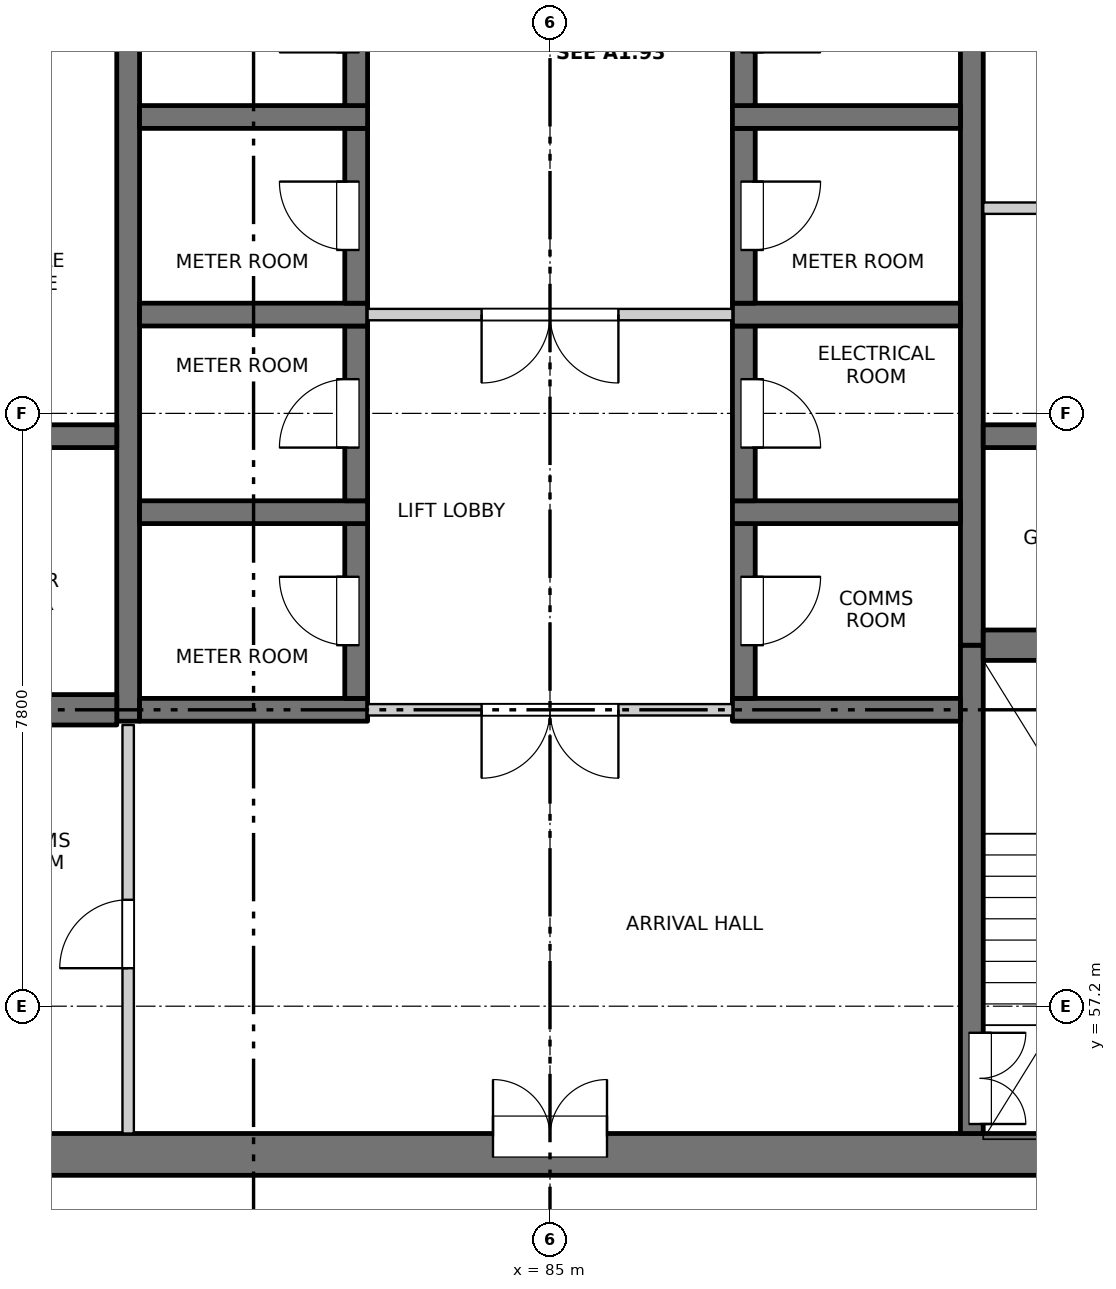
"""IFC4 building model, lengths in metres.
Left out: names, types, materials, properties, quantities, classifications, styles, units other than length and angle.
Written with IfcOpenShell. Run it as: python <this file> out.ifc"""

import sys

from ifc_helpers import new_model, si_unit, direction, frame, frame_2d, origin, place, context, subcontext, project, spatial, rectangle, extrude, element, fill, save


model = new_model("IFC4")
c1 = context("Model", 3, precision=1e-05, world=origin(), true_north=direction((0.0, 1.0)))
c2 = subcontext(c1, "Body", "Model", "MODEL_VIEW")
j1 = project(units=[si_unit("LENGTHUNIT", "METRE"), si_unit("PLANEANGLEUNIT", "RADIAN")], contexts=[c1])
p1 = place(None, origin())
s1 = spatial("IfcSite", under=j1, at=p1, CompositionType="ELEMENT")
p2 = place(p1, origin())
s2 = spatial("IfcBuilding", under=s1, at=p2, CompositionType="ELEMENT")
p3 = place(p2, frame((0.0, 0.0, 152.0)))
s3 = spatial("IfcBuildingStorey", under=s2, at=p3, CompositionType="ELEMENT", Elevation=152.0)
p4 = place(p3, frame((75.525, 55.25, -0.25), z_axis=(0.0, 0.0, 1.0), x_axis=(1.0, 0.0, 0.0)))
e1 = element("IfcWall", 1, at=p4, inside=s3, PredefinedType="SOLIDWALL", context=c2, shape_type="SweptSolid", body=[
    extrude(rectangle(XDim=18.95, YDim=0.55, at=frame_2d((9.475, 0.0))), origin(), (0.0, 0.0, 1.0), 3.4),
])
p5 = place(p4, frame((8.725, 0.0, 0.25)))
e2 = element("IfcOpeningElement", 2, at=p5, cuts=e1, PredefinedType="OPENING", context=c2, shape_type="SweptSolid", body=[
    extrude(rectangle(XDim=1.5, YDim=2.1, at=frame_2d((0.75, 1.05))), frame((0.0, 0.285, 0.0), z_axis=(0.0, -1.0, 0.0), x_axis=(1.0, 0.0, 0.0)), (0.0, 0.0, 1.0), 0.57),
])
p6 = place(p3, frame((79.45, 60.95, -0.25), z_axis=(0.0, 0.0, 1.0), x_axis=(0.0, 1.0, 0.0)))
e3 = element("IfcWall", 3, at=p6, inside=s3, PredefinedType="SOLIDWALL", context=c2, shape_type="SweptSolid", body=[
    extrude(rectangle(XDim=16.35, YDim=0.3, at=frame_2d((8.175, 0.0))), origin(), (0.0, 0.0, 1.0), 3.4),
])
p7 = place(p3, frame((90.55, 55.525, -0.25), z_axis=(0.0, 0.0, 1.0), x_axis=(0.0, 1.0, 0.0)))
e4 = element("IfcWall", 4, at=p7, inside=s3, PredefinedType="SOLIDWALL", context=c2, shape_type="SweptSolid", body=[
    extrude(rectangle(XDim=6.425, YDim=0.3, at=frame_2d((3.212, 0.0))), origin(), (0.0, 0.0, 1.0), 3.4),
])
p8 = place(p7, frame((0.125, 0.0, 0.25)))
e5 = element("IfcOpeningElement", 5, at=p8, cuts=e4, PredefinedType="OPENING", context=c2, shape_type="SweptSolid", body=[
    extrude(rectangle(XDim=1.2, YDim=2.1, at=frame_2d((0.6, 1.05))), frame((0.0, 0.16, 0.0), z_axis=(0.0, -1.0, 0.0), x_axis=(1.0, 0.0, 0.0)), (0.0, 0.0, 1.0), 0.32),
])
p9 = place(p3, frame((90.55, 61.95, -0.25), z_axis=(0.0, 0.0, 1.0), x_axis=(0.0, 1.0, 0.0)))
e6 = element("IfcWall", 6, at=p9, inside=s3, PredefinedType="SOLIDWALL", context=c2, shape_type="SweptSolid", body=[
    extrude(rectangle(XDim=15.35, YDim=0.3, at=frame_2d((7.675, 0.0))), origin(), (0.0, 0.0, 1.0), 3.4),
])
p10 = place(p3, frame((79.6, 61.1, -0.25), z_axis=(0.0, 0.0, 1.0), x_axis=(1.0, 0.0, 0.0)))
e7 = element("IfcWall", 7, at=p10, inside=s3, PredefinedType="SOLIDWALL", context=c2, shape_type="SweptSolid", body=[
    extrude(rectangle(XDim=3.0, YDim=0.3, at=frame_2d((1.5, 0.0))), origin(), (0.0, 0.0, 1.0), 3.4),
])
p11 = place(p3, frame((82.45, 61.25, -0.25), z_axis=(0.0, 0.0, 1.0), x_axis=(0.0, 1.0, 0.0)))
e8 = element("IfcWall", 8, at=p11, inside=s3, PredefinedType="SOLIDWALL", context=c2, shape_type="SweptSolid", body=[
    extrude(rectangle(XDim=2.3, YDim=0.3, at=frame_2d((1.15, 0.0))), origin(), (0.0, 0.0, 1.0), 3.4),
])
p12 = place(p11, frame((0.7, 0.0, 0.25)))
e9 = element("IfcOpeningElement", 9, at=p12, cuts=e8, PredefinedType="OPENING", context=c2, shape_type="SweptSolid", body=[
    extrude(rectangle(XDim=0.9, YDim=2.1, at=frame_2d((0.45, 1.05))), frame((0.0, 0.16, 0.0), z_axis=(0.0, -1.0, 0.0), x_axis=(1.0, 0.0, 0.0)), (0.0, 0.0, 1.0), 0.32),
])
p13 = place(p3, frame((79.6, 63.7, -0.25), z_axis=(0.0, 0.0, 1.0), x_axis=(1.0, 0.0, 0.0)))
e10 = element("IfcWall", 10, at=p13, inside=s3, PredefinedType="SOLIDWALL", context=c2, shape_type="SweptSolid", body=[
    extrude(rectangle(XDim=3.0, YDim=0.3, at=frame_2d((1.5, 0.0))), origin(), (0.0, 0.0, 1.0), 3.4),
])
p14 = place(p3, frame((82.45, 63.85, -0.25), z_axis=(0.0, 0.0, 1.0), x_axis=(0.0, 1.0, 0.0)))
e11 = element("IfcWall", 11, at=p14, inside=s3, PredefinedType="SOLIDWALL", context=c2, shape_type="SweptSolid", body=[
    extrude(rectangle(XDim=2.3, YDim=0.3, at=frame_2d((1.15, 0.0))), origin(), (0.0, 0.0, 1.0), 3.4),
])
p15 = place(p14, frame((0.7, 0.0, 0.25)))
e12 = element("IfcOpeningElement", 12, at=p15, cuts=e11, PredefinedType="OPENING", context=c2, shape_type="SweptSolid", body=[
    extrude(rectangle(XDim=0.9, YDim=2.1, at=frame_2d((0.45, 1.05))), frame((0.0, 0.16, 0.0), z_axis=(0.0, -1.0, 0.0), x_axis=(1.0, 0.0, 0.0)), (0.0, 0.0, 1.0), 0.32),
])
p16 = place(p3, frame((79.6, 66.3, -0.25), z_axis=(0.0, 0.0, 1.0), x_axis=(1.0, 0.0, 0.0)))
e13 = element("IfcWall", 13, at=p16, inside=s3, PredefinedType="SOLIDWALL", context=c2, shape_type="SweptSolid", body=[
    extrude(rectangle(XDim=3.0, YDim=0.3, at=frame_2d((1.5, 0.0))), origin(), (0.0, 0.0, 1.0), 3.4),
])
p17 = place(p3, frame((82.45, 66.45, -0.25), z_axis=(0.0, 0.0, 1.0), x_axis=(0.0, 1.0, 0.0)))
e14 = element("IfcWall", 14, at=p17, inside=s3, PredefinedType="SOLIDWALL", context=c2, shape_type="SweptSolid", body=[
    extrude(rectangle(XDim=2.3, YDim=0.3, at=frame_2d((1.15, 0.0))), origin(), (0.0, 0.0, 1.0), 3.4),
])
p18 = place(p17, frame((0.7, 0.0, 0.25)))
e15 = element("IfcOpeningElement", 15, at=p18, cuts=e14, PredefinedType="OPENING", context=c2, shape_type="SweptSolid", body=[
    extrude(rectangle(XDim=0.9, YDim=2.1, at=frame_2d((0.45, 1.05))), frame((0.0, 0.16, 0.0), z_axis=(0.0, -1.0, 0.0), x_axis=(1.0, 0.0, 0.0)), (0.0, 0.0, 1.0), 0.32),
])
p19 = place(p3, frame((79.6, 68.9, -0.25), z_axis=(0.0, 0.0, 1.0), x_axis=(1.0, 0.0, 0.0)))
e16 = element("IfcWall", 16, at=p19, inside=s3, PredefinedType="SOLIDWALL", context=c2, shape_type="SweptSolid", body=[
    extrude(rectangle(XDim=3.0, YDim=0.3, at=frame_2d((1.5, 0.0))), origin(), (0.0, 0.0, 1.0), 3.4),
])
p20 = place(p3, frame((82.45, 69.05, -0.25), z_axis=(0.0, 0.0, 1.0), x_axis=(0.0, 1.0, 0.0)))
e17 = element("IfcWall", 17, at=p20, inside=s3, PredefinedType="SOLIDWALL", context=c2, shape_type="SweptSolid", body=[
    extrude(rectangle(XDim=2.3, YDim=0.3, at=frame_2d((1.15, 0.0))), origin(), (0.0, 0.0, 1.0), 3.4),
])
p21 = place(p20, frame((0.7, 0.0, 0.25)))
e18 = element("IfcOpeningElement", 18, at=p21, cuts=e17, PredefinedType="OPENING", context=c2, shape_type="SweptSolid", body=[
    extrude(rectangle(XDim=0.9, YDim=2.1, at=frame_2d((0.45, 1.05))), frame((0.0, 0.16, 0.0), z_axis=(0.0, -1.0, 0.0), x_axis=(1.0, 0.0, 0.0)), (0.0, 0.0, 1.0), 0.32),
])
p22 = place(p3, frame((87.4, 61.1, -0.25), z_axis=(0.0, 0.0, 1.0), x_axis=(1.0, 0.0, 0.0)))
e19 = element("IfcWall", 19, at=p22, inside=s3, PredefinedType="SOLIDWALL", context=c2, shape_type="SweptSolid", body=[
    extrude(rectangle(XDim=3.0, YDim=0.3, at=frame_2d((1.5, 0.0))), origin(), (0.0, 0.0, 1.0), 3.4),
])
p23 = place(p3, frame((87.55, 61.25, -0.25), z_axis=(0.0, 0.0, 1.0), x_axis=(0.0, 1.0, 0.0)))
e20 = element("IfcWall", 20, at=p23, inside=s3, PredefinedType="SOLIDWALL", context=c2, shape_type="SweptSolid", body=[
    extrude(rectangle(XDim=2.3, YDim=0.3, at=frame_2d((1.15, 0.0))), origin(), (0.0, 0.0, 1.0), 3.4),
])
p24 = place(p23, frame((0.7, 0.0, 0.25)))
e21 = element("IfcOpeningElement", 21, at=p24, cuts=e20, PredefinedType="OPENING", context=c2, shape_type="SweptSolid", body=[
    extrude(rectangle(XDim=0.9, YDim=2.1, at=frame_2d((0.45, 1.05))), frame((0.0, 0.16, 0.0), z_axis=(0.0, -1.0, 0.0), x_axis=(1.0, 0.0, 0.0)), (0.0, 0.0, 1.0), 0.32),
])
p25 = place(p3, frame((87.4, 63.7, -0.25), z_axis=(0.0, 0.0, 1.0), x_axis=(1.0, 0.0, 0.0)))
e22 = element("IfcWall", 22, at=p25, inside=s3, PredefinedType="SOLIDWALL", context=c2, shape_type="SweptSolid", body=[
    extrude(rectangle(XDim=3.0, YDim=0.3, at=frame_2d((1.5, 0.0))), origin(), (0.0, 0.0, 1.0), 3.4),
])
p26 = place(p3, frame((87.55, 63.85, -0.25), z_axis=(0.0, 0.0, 1.0), x_axis=(0.0, 1.0, 0.0)))
e23 = element("IfcWall", 23, at=p26, inside=s3, PredefinedType="SOLIDWALL", context=c2, shape_type="SweptSolid", body=[
    extrude(rectangle(XDim=2.3, YDim=0.3, at=frame_2d((1.15, 0.0))), origin(), (0.0, 0.0, 1.0), 3.4),
])
p27 = place(p26, frame((0.7, 0.0, 0.25)))
e24 = element("IfcOpeningElement", 24, at=p27, cuts=e23, PredefinedType="OPENING", context=c2, shape_type="SweptSolid", body=[
    extrude(rectangle(XDim=0.9, YDim=2.1, at=frame_2d((0.45, 1.05))), frame((0.0, 0.16, 0.0), z_axis=(0.0, -1.0, 0.0), x_axis=(1.0, 0.0, 0.0)), (0.0, 0.0, 1.0), 0.32),
])
p28 = place(p3, frame((87.4, 66.3, -0.25), z_axis=(0.0, 0.0, 1.0), x_axis=(1.0, 0.0, 0.0)))
e25 = element("IfcWall", 25, at=p28, inside=s3, PredefinedType="SOLIDWALL", context=c2, shape_type="SweptSolid", body=[
    extrude(rectangle(XDim=3.0, YDim=0.3, at=frame_2d((1.5, 0.0))), origin(), (0.0, 0.0, 1.0), 3.4),
])
p29 = place(p3, frame((87.55, 66.45, -0.25), z_axis=(0.0, 0.0, 1.0), x_axis=(0.0, 1.0, 0.0)))
e26 = element("IfcWall", 26, at=p29, inside=s3, PredefinedType="SOLIDWALL", context=c2, shape_type="SweptSolid", body=[
    extrude(rectangle(XDim=2.3, YDim=0.3, at=frame_2d((1.15, 0.0))), origin(), (0.0, 0.0, 1.0), 3.4),
])
p30 = place(p29, frame((0.7, 0.0, 0.25)))
e27 = element("IfcOpeningElement", 27, at=p30, cuts=e26, PredefinedType="OPENING", context=c2, shape_type="SweptSolid", body=[
    extrude(rectangle(XDim=0.9, YDim=2.1, at=frame_2d((0.45, 1.05))), frame((0.0, 0.16, 0.0), z_axis=(0.0, -1.0, 0.0), x_axis=(1.0, 0.0, 0.0)), (0.0, 0.0, 1.0), 0.32),
])
p31 = place(p3, frame((87.4, 68.9, -0.25), z_axis=(0.0, 0.0, 1.0), x_axis=(1.0, 0.0, 0.0)))
e28 = element("IfcWall", 28, at=p31, inside=s3, PredefinedType="SOLIDWALL", context=c2, shape_type="SweptSolid", body=[
    extrude(rectangle(XDim=3.0, YDim=0.3, at=frame_2d((1.5, 0.0))), origin(), (0.0, 0.0, 1.0), 3.4),
])
p32 = place(p3, frame((87.55, 69.05, -0.25), z_axis=(0.0, 0.0, 1.0), x_axis=(0.0, 1.0, 0.0)))
e29 = element("IfcWall", 29, at=p32, inside=s3, PredefinedType="SOLIDWALL", context=c2, shape_type="SweptSolid", body=[
    extrude(rectangle(XDim=2.3, YDim=0.3, at=frame_2d((1.15, 0.0))), origin(), (0.0, 0.0, 1.0), 3.4),
])
p33 = place(p32, frame((0.7, 0.0, 0.25)))
e30 = element("IfcOpeningElement", 30, at=p33, cuts=e29, PredefinedType="OPENING", context=c2, shape_type="SweptSolid", body=[
    extrude(rectangle(XDim=0.9, YDim=2.1, at=frame_2d((0.45, 1.05))), frame((0.0, 0.16, 0.0), z_axis=(0.0, -1.0, 0.0), x_axis=(1.0, 0.0, 0.0)), (0.0, 0.0, 1.0), 0.32),
])
p34 = place(p3, frame((75.525, 61.1, -0.25), z_axis=(0.0, 0.0, 1.0), x_axis=(1.0, 0.0, 0.0)))
e31 = element("IfcWall", 31, at=p34, inside=s3, PredefinedType="SOLIDWALL", context=c2, shape_type="SweptSolid", body=[
    extrude(rectangle(XDim=3.775, YDim=0.4, at=frame_2d((1.888, 0.0))), origin(), (0.0, 0.0, 1.0), 3.4),
])
p35 = place(p3, frame((75.525, 64.7, -0.25), z_axis=(0.0, 0.0, 1.0), x_axis=(1.0, 0.0, 0.0)))
e32 = element("IfcWall", 32, at=p35, inside=s3, PredefinedType="SOLIDWALL", context=c2, shape_type="SweptSolid", body=[
    extrude(rectangle(XDim=3.775, YDim=0.3, at=frame_2d((1.888, 0.0))), origin(), (0.0, 0.0, 1.0), 3.4),
])
p36 = place(p3, frame((90.7, 61.95, -0.25), z_axis=(0.0, 0.0, 1.0), x_axis=(1.0, 0.0, 0.0)))
e33 = element("IfcWall", 33, at=p36, inside=s3, PredefinedType="SOLIDWALL", context=c2, shape_type="SweptSolid", body=[
    extrude(rectangle(XDim=3.775, YDim=0.4, at=frame_2d((1.888, 0.0))), origin(), (0.0, 0.0, 1.0), 3.4),
])
p37 = place(p3, frame((90.7, 64.7, -0.25), z_axis=(0.0, 0.0, 1.0), x_axis=(1.0, 0.0, 0.0)))
e34 = element("IfcWall", 34, at=p37, inside=s3, PredefinedType="SOLIDWALL", context=c2, shape_type="SweptSolid", body=[
    extrude(rectangle(XDim=3.775, YDim=0.3, at=frame_2d((1.888, 0.0))), origin(), (0.0, 0.0, 1.0), 3.4),
])
p38 = place(p3, frame((82.6, 61.1, 0.0), z_axis=(0.0, 0.0, 1.0), x_axis=(1.0, 0.0, 0.0)))
e35 = element("IfcWall", 35, at=p38, inside=s3, PredefinedType="PARTITIONING", context=c2, shape_type="SweptSolid", body=[
    extrude(rectangle(XDim=4.8, YDim=0.15, at=frame_2d((2.4, 0.0))), origin(), (0.0, 0.0, 1.0), 3.15),
])
p39 = place(p38, frame((1.5, 0.0, 0.0)))
e36 = element("IfcOpeningElement", 36, at=p39, cuts=e35, PredefinedType="OPENING", context=c2, shape_type="SweptSolid", body=[
    extrude(rectangle(XDim=1.8, YDim=2.1, at=frame_2d((0.9, 1.05))), frame((0.0, 0.085, 0.0), z_axis=(0.0, -1.0, 0.0), x_axis=(1.0, 0.0, 0.0)), (0.0, 0.0, 1.0), 0.17),
])
p40 = place(p3, frame((82.6, 66.3, 0.0), z_axis=(0.0, 0.0, 1.0), x_axis=(1.0, 0.0, 0.0)))
e37 = element("IfcWall", 37, at=p40, inside=s3, PredefinedType="PARTITIONING", context=c2, shape_type="SweptSolid", body=[
    extrude(rectangle(XDim=4.8, YDim=0.15, at=frame_2d((2.4, 0.0))), origin(), (0.0, 0.0, 1.0), 3.15),
])
p41 = place(p40, frame((1.5, 0.0, 0.0)))
e38 = element("IfcOpeningElement", 38, at=p41, cuts=e37, PredefinedType="OPENING", context=c2, shape_type="SweptSolid", body=[
    extrude(rectangle(XDim=1.8, YDim=2.1, at=frame_2d((0.9, 1.05))), frame((0.0, 0.085, 0.0), z_axis=(0.0, -1.0, 0.0), x_axis=(1.0, 0.0, 0.0)), (0.0, 0.0, 1.0), 0.17),
])
p42 = place(p3, frame((90.7, 67.7, 0.0), z_axis=(0.0, 0.0, 1.0), x_axis=(1.0, 0.0, 0.0)))
e39 = element("IfcWall", 39, at=p42, inside=s3, PredefinedType="PARTITIONING", context=c2, shape_type="SweptSolid", body=[
    extrude(rectangle(XDim=3.775, YDim=0.15, at=frame_2d((1.887, 0.0))), origin(), (0.0, 0.0, 1.0), 3.15),
])
p43 = place(p3, frame((79.45, 55.525, 0.0), z_axis=(0.0, 0.0, 1.0), x_axis=(0.0, 1.0, 0.0)))
e40 = element("IfcWall", 40, at=p43, inside=s3, PredefinedType="PARTITIONING", context=c2, shape_type="SweptSolid", body=[
    extrude(rectangle(XDim=5.375, YDim=0.15, at=frame_2d((2.688, 0.0))), origin(), (0.0, 0.0, 1.0), 3.15),
])
p44 = place(p43, frame((2.175, 0.0, 0.0)))
e41 = element("IfcOpeningElement", 41, at=p44, cuts=e40, PredefinedType="OPENING", context=c2, shape_type="SweptSolid", body=[
    extrude(rectangle(XDim=0.9, YDim=2.1, at=frame_2d((0.45, 1.05))), frame((0.0, 0.085, 0.0), z_axis=(0.0, -1.0, 0.0), x_axis=(1.0, 0.0, 0.0)), (0.0, 0.0, 1.0), 0.17),
])
p45 = place(p5, origin())
e42 = element("IfcDoor", 42, at=p45, inside=s3, OperationType="DOUBLE_DOOR_SINGLE_SWING", PredefinedType="DOOR", context=c2, shape_type="SweptSolid", body=[
    extrude(rectangle(XDim=1.5, YDim=2.1, at=frame_2d((0.75, 1.05))), frame((0.0, 0.26, 0.0), z_axis=(0.0, -1.0, 0.0), x_axis=(1.0, 0.0, 0.0)), (0.0, 0.0, 1.0), 0.05),
])
fill(e2, e42)
p46 = place(p8, origin())
e43 = element("IfcDoor", 43, at=p46, inside=s3, OperationType="DOUBLE_DOOR_SINGLE_SWING", PredefinedType="DOOR", context=c2, shape_type="SweptSolid", body=[
    extrude(rectangle(XDim=1.2, YDim=2.1, at=frame_2d((0.6, 1.05))), frame((0.0, -0.085, 0.0), z_axis=(0.0, -1.0, 0.0), x_axis=(1.0, 0.0, 0.0)), (0.0, 0.0, 1.0), 0.05),
])
fill(e5, e43)
p47 = place(p44, origin())
e44 = element("IfcDoor", 44, at=p47, inside=s3, OperationType="SINGLE_SWING_LEFT", PredefinedType="DOOR", context=c2, shape_type="SweptSolid", body=[
    extrude(rectangle(XDim=0.9, YDim=2.1, at=frame_2d((0.45, 1.05))), frame((0.0, 0.025, 0.0), z_axis=(0.0, -1.0, 0.0), x_axis=(1.0, 0.0, 0.0)), (0.0, 0.0, 1.0), 0.05),
])
fill(e41, e44)
p48 = place(p39, origin())
e45 = element("IfcDoor", 45, at=p48, inside=s3, OperationType="DOUBLE_DOOR_SINGLE_SWING", PredefinedType="DOOR", context=c2, shape_type="SweptSolid", body=[
    extrude(rectangle(XDim=1.8, YDim=2.1, at=frame_2d((0.9, 1.05))), frame((0.0, 0.025, 0.0), z_axis=(0.0, -1.0, 0.0), x_axis=(1.0, 0.0, 0.0)), (0.0, 0.0, 1.0), 0.05),
])
fill(e36, e45)
p49 = place(p12, origin())
e46 = element("IfcDoor", 46, at=p49, inside=s3, OperationType="SINGLE_SWING_RIGHT", PredefinedType="DOOR", context=c2, shape_type="SweptSolid", body=[
    extrude(rectangle(XDim=0.9, YDim=2.1, at=frame_2d((0.45, 1.05))), frame((0.0, 0.135, 0.0), z_axis=(0.0, -1.0, 0.0), x_axis=(1.0, 0.0, 0.0)), (0.0, 0.0, 1.0), 0.05),
])
fill(e9, e46)
p50 = place(p24, origin())
e47 = element("IfcDoor", 47, at=p50, inside=s3, OperationType="SINGLE_SWING_LEFT", PredefinedType="DOOR", context=c2, shape_type="SweptSolid", body=[
    extrude(rectangle(XDim=0.9, YDim=2.1, at=frame_2d((0.45, 1.05))), frame((0.0, -0.085, 0.0), z_axis=(0.0, -1.0, 0.0), x_axis=(1.0, 0.0, 0.0)), (0.0, 0.0, 1.0), 0.05),
])
fill(e21, e47)
p51 = place(p15, origin())
e48 = element("IfcDoor", 48, at=p51, inside=s3, OperationType="SINGLE_SWING_LEFT", PredefinedType="DOOR", context=c2, shape_type="SweptSolid", body=[
    extrude(rectangle(XDim=0.9, YDim=2.1, at=frame_2d((0.45, 1.05))), frame((0.0, 0.135, 0.0), z_axis=(0.0, -1.0, 0.0), x_axis=(1.0, 0.0, 0.0)), (0.0, 0.0, 1.0), 0.05),
])
fill(e12, e48)
p52 = place(p27, origin())
e49 = element("IfcDoor", 49, at=p52, inside=s3, OperationType="SINGLE_SWING_RIGHT", PredefinedType="DOOR", context=c2, shape_type="SweptSolid", body=[
    extrude(rectangle(XDim=0.9, YDim=2.1, at=frame_2d((0.45, 1.05))), frame((0.0, -0.085, 0.0), z_axis=(0.0, -1.0, 0.0), x_axis=(1.0, 0.0, 0.0)), (0.0, 0.0, 1.0), 0.05),
])
fill(e24, e49)
p53 = place(p41, origin())
e50 = element("IfcDoor", 50, at=p53, inside=s3, OperationType="DOUBLE_DOOR_SINGLE_SWING", PredefinedType="DOOR", context=c2, shape_type="SweptSolid", body=[
    extrude(rectangle(XDim=1.8, YDim=2.1, at=frame_2d((0.9, 1.05))), frame((0.0, 0.025, 0.0), z_axis=(0.0, -1.0, 0.0), x_axis=(1.0, 0.0, 0.0)), (0.0, 0.0, 1.0), 0.05),
])
fill(e38, e50)
p54 = place(p18, origin())
e51 = element("IfcDoor", 51, at=p54, inside=s3, OperationType="SINGLE_SWING_RIGHT", PredefinedType="DOOR", context=c2, shape_type="SweptSolid", body=[
    extrude(rectangle(XDim=0.9, YDim=2.1, at=frame_2d((0.45, 1.05))), frame((0.0, 0.135, 0.0), z_axis=(0.0, -1.0, 0.0), x_axis=(1.0, 0.0, 0.0)), (0.0, 0.0, 1.0), 0.05),
])
fill(e15, e51)
p55 = place(p30, origin())
e52 = element("IfcDoor", 52, at=p55, inside=s3, OperationType="SINGLE_SWING_LEFT", PredefinedType="DOOR", context=c2, shape_type="SweptSolid", body=[
    extrude(rectangle(XDim=0.9, YDim=2.1, at=frame_2d((0.45, 1.05))), frame((0.0, -0.085, 0.0), z_axis=(0.0, -1.0, 0.0), x_axis=(1.0, 0.0, 0.0)), (0.0, 0.0, 1.0), 0.05),
])
fill(e27, e52)
save(model, sys.argv[1])
